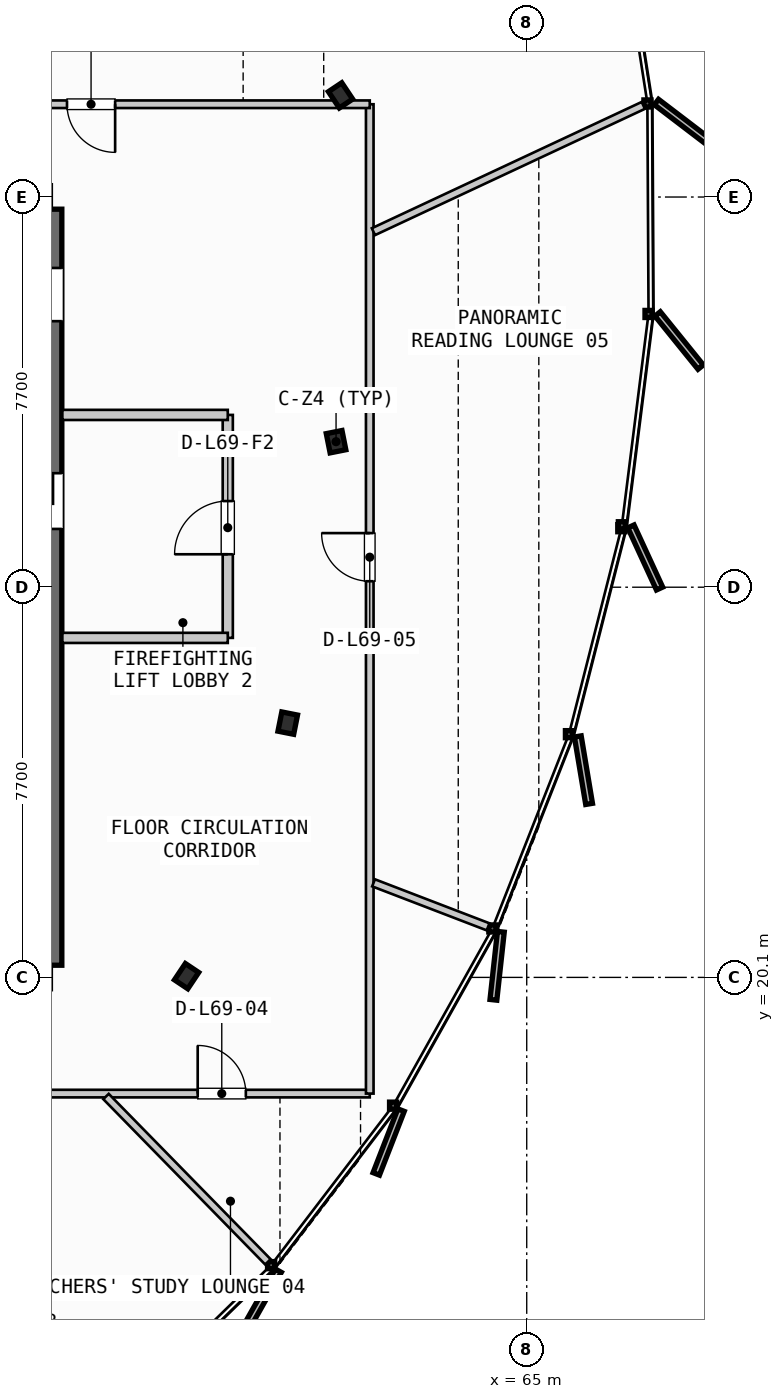
"""IFC4 building model, lengths in metres.
Left out: names, types, materials, properties, quantities, classifications, styles, units other than length and angle.
Written with IfcOpenShell. Run it as: python <this file> out.ifc"""

import sys

from ifc_helpers import new_model, si_unit, direction, frame, frame_2d, origin, origin_2d, place, context, subcontext, project, spatial, rectangle, i_section, extrude, source, transform, mapped, element, fill, save


model = new_model("IFC4")
c1 = context("Model", 3, precision=1e-05, world=origin(), true_north=direction((0.0, 1.0)))
c2 = subcontext(c1, "Body", "Model", "MODEL_VIEW")
j1 = project(units=[si_unit("LENGTHUNIT", "METRE"), si_unit("PLANEANGLEUNIT", "RADIAN")], contexts=[c1])
p1 = place(None, origin())
s1 = spatial("IfcSite", under=j1, at=p1, CompositionType="ELEMENT")
p2 = place(p1, origin())
s2 = spatial("IfcBuilding", under=s1, at=p2, CompositionType="ELEMENT")
p3 = place(p2, frame((0.0, 0.0, 262.9)))
s3 = spatial("IfcBuildingStorey", under=s2, at=p3, CompositionType="ELEMENT", Elevation=262.9)
p4 = place(p3, frame((55.6, 20.34, 0.0), z_axis=(0.0, 0.0, 1.0), x_axis=(0.0, 1.0, 0.0)))
e1 = element("IfcWall", 1, at=p4, inside=s3, PredefinedType="SHEAR", context=c2, shape_type="SweptSolid", body=[
    extrude(rectangle(XDim=14.92, YDim=0.45, at=frame_2d((7.46, 0.0))), origin(), (0.0, 0.0, 1.0), 3.21),
])
p5 = place(p4, frame((12.71, 0.0, 0.0)))
e2 = element("IfcOpeningElement", 2, at=p5, cuts=e1, PredefinedType="OPENING", context=c2, shape_type="SweptSolid", body=[
    extrude(rectangle(XDim=1.05, YDim=2.15, at=frame_2d((0.525, 1.075))), frame((0.0, 0.235, 0.0), z_axis=(0.0, -1.0, 0.0), x_axis=(1.0, 0.0, 0.0)), (0.0, 0.0, 1.0), 0.47),
])
p6 = place(p4, frame((8.61, 0.0, 0.0)))
e3 = element("IfcOpeningElement", 3, at=p6, cuts=e1, PredefinedType="OPENING", context=c2, shape_type="SweptSolid", body=[
    extrude(rectangle(XDim=1.1, YDim=2.2, at=frame_2d((0.55, 1.1))), frame((0.0, 0.235, 0.0), z_axis=(0.0, -1.0, 0.0), x_axis=(1.0, 0.0, 0.0)), (0.0, 0.0, 1.0), 0.47),
])
m1 = source(origin(), c2, "Body", "SweptSolid", [
    extrude(i_section(OverallWidth=0.387, OverallDepth=0.316, WebThickness=0.019, FlangeThickness=0.028, FilletRadius=0.015, at=origin_2d()), origin(), (0.0, 0.0, 1.0), 3.21),
])
for number, where, z_axis, x_axis in (
    (4, (61.237, 30.672, 0.0), (0.0, 0.0, 1.0), (0.981, 0.195, 0.0)),
    (5, (61.326, 37.506, 0.0), (0.0, 0.0, 1.0), (0.831, 0.556, 0.0)),
    (6, (58.287, 20.125, 0.0), (0.0, 0.0, 1.0), (0.831, -0.556, 0.0)),
    (7, (60.284, 25.118, 0.0), (0.0, 0.0, 1.0), (0.981, -0.195, 0.0)),
):
    element("IfcColumn", number, at=place(p3, frame(where, z_axis=z_axis, x_axis=x_axis)), inside=s3, PredefinedType="COLUMN", context=c2, shape_type="MappedRepresentation", body=[
        mapped(m1, transform((0.0, 0.0, 0.0), scale=1.0)),
    ])
p7 = place(p3, frame((59.1, 26.8, 0.0), z_axis=(0.0, 0.0, 1.0), x_axis=(0.0, 1.0, 0.0)))
e8 = element("IfcWall", 8, at=p7, inside=s3, PredefinedType="PARTITIONING", context=c2, shape_type="SweptSolid", body=[
    extrude(rectangle(XDim=4.4, YDim=0.2, at=frame_2d((2.2, 0.0))), origin(), (0.0, 0.0, 1.0), 2.735),
])
p8 = place(p7, frame((1.65, 0.0, 0.0)))
e9 = element("IfcOpeningElement", 9, at=p8, cuts=e8, PredefinedType="OPENING", context=c2, shape_type="SweptSolid", body=[
    extrude(rectangle(XDim=1.05, YDim=2.15, at=frame_2d((0.525, 1.075))), frame((0.0, 0.11, 0.0), z_axis=(0.0, -1.0, 0.0), x_axis=(1.0, 0.0, 0.0)), (0.0, 0.0, 1.0), 0.22),
])
for number, where, z_axis, x_axis in (
    (10, (55.835, 26.8, 0.0), (0.0, 0.0, 1.0), (1.0, 0.0, 0.0)),
    (11, (55.835, 31.2, 0.0), (0.0, 0.0, 1.0), (1.0, 0.0, 0.0)),
):
    element("IfcWall", number, at=place(p3, frame(where, z_axis=z_axis, x_axis=x_axis)), inside=s3, PredefinedType="PARTITIONING", context=c2, shape_type="SweptSolid", body=[
        extrude(rectangle(XDim=3.265, YDim=0.2, at=frame_2d((1.633, 0.0))), origin(), (0.0, 0.0, 1.0), 2.735),
    ])
p9 = place(p3, frame((32.46, 17.807, 0.0), z_axis=(0.0, 0.0, 1.0), x_axis=(1.0, 0.0, 0.0)))
e12 = element("IfcWall", 12, at=p9, inside=s3, PredefinedType="PARTITIONING", context=c2, shape_type="SweptSolid", body=[
    extrude(rectangle(XDim=29.442, YDim=0.15, at=frame_2d((14.721, 0.0))), origin(), (0.0, 0.0, 1.0), 2.735),
])
p10 = place(p9, frame((5.57, 0.0, 0.0)))
e13 = element("IfcOpeningElement", 13, at=p10, cuts=e12, PredefinedType="OPENING", context=c2, shape_type="SweptSolid", body=[
    extrude(rectangle(XDim=0.95, YDim=2.15, at=frame_2d((0.475, 1.075))), frame((0.0, 0.085, 0.0), z_axis=(0.0, -1.0, 0.0), x_axis=(1.0, 0.0, 0.0)), (0.0, 0.0, 1.0), 0.17),
])
p11 = place(p9, frame((11.599, 0.0, 0.0)))
e14 = element("IfcOpeningElement", 14, at=p11, cuts=e12, PredefinedType="OPENING", context=c2, shape_type="SweptSolid", body=[
    extrude(rectangle(XDim=0.95, YDim=2.15, at=frame_2d((0.475, 1.075))), frame((0.0, 0.085, 0.0), z_axis=(0.0, -1.0, 0.0), x_axis=(1.0, 0.0, 0.0)), (0.0, 0.0, 1.0), 0.17),
])
p12 = place(p9, frame((18.949, 0.0, 0.0)))
e15 = element("IfcOpeningElement", 15, at=p12, cuts=e12, PredefinedType="OPENING", context=c2, shape_type="SweptSolid", body=[
    extrude(rectangle(XDim=0.95, YDim=2.15, at=frame_2d((0.475, 1.075))), frame((0.0, 0.085, 0.0), z_axis=(0.0, -1.0, 0.0), x_axis=(1.0, 0.0, 0.0)), (0.0, 0.0, 1.0), 0.17),
])
p13 = place(p9, frame((26.046, 0.0, 0.0)))
e16 = element("IfcOpeningElement", 16, at=p13, cuts=e12, PredefinedType="OPENING", context=c2, shape_type="SweptSolid", body=[
    extrude(rectangle(XDim=0.95, YDim=2.15, at=frame_2d((0.475, 1.075))), frame((0.0, 0.085, 0.0), z_axis=(0.0, -1.0, 0.0), x_axis=(1.0, 0.0, 0.0)), (0.0, 0.0, 1.0), 0.17),
])
p14 = place(p3, frame((61.902, 17.807, 0.0), z_axis=(0.0, 0.0, 1.0), x_axis=(0.0, 1.0, 0.0)))
e17 = element("IfcWall", 17, at=p14, inside=s3, PredefinedType="PARTITIONING", context=c2, shape_type="SweptSolid", body=[
    extrude(rectangle(XDim=19.524, YDim=0.15, at=frame_2d((9.762, 0.0))), origin(), (0.0, 0.0, 1.0), 2.735),
])
p15 = place(p14, frame((10.111, 0.0, 0.0)))
e18 = element("IfcOpeningElement", 18, at=p15, cuts=e17, PredefinedType="OPENING", context=c2, shape_type="SweptSolid", body=[
    extrude(rectangle(XDim=0.95, YDim=2.15, at=frame_2d((0.475, 1.075))), frame((0.0, 0.085, 0.0), z_axis=(0.0, -1.0, 0.0), x_axis=(1.0, 0.0, 0.0)), (0.0, 0.0, 1.0), 0.17),
])
p16 = place(p3, frame((61.902, 37.331, 0.0), z_axis=(0.0, 0.0, 1.0), x_axis=(-1.0, 0.0, 0.0)))
e19 = element("IfcWall", 19, at=p16, inside=s3, PredefinedType="PARTITIONING", context=c2, shape_type="SweptSolid", body=[
    extrude(rectangle(XDim=29.442, YDim=0.15, at=frame_2d((14.721, 0.0))), origin(), (0.0, 0.0, 1.0), 2.735),
])
p17 = place(p16, frame((5.025, 0.0, 0.0)))
e20 = element("IfcOpeningElement", 20, at=p17, cuts=e19, PredefinedType="OPENING", context=c2, shape_type="SweptSolid", body=[
    extrude(rectangle(XDim=0.95, YDim=2.15, at=frame_2d((0.475, 1.075))), frame((0.0, 0.085, 0.0), z_axis=(0.0, -1.0, 0.0), x_axis=(1.0, 0.0, 0.0)), (0.0, 0.0, 1.0), 0.17),
])
p18 = place(p16, frame((12.153, 0.0, 0.0)))
e21 = element("IfcOpeningElement", 21, at=p18, cuts=e19, PredefinedType="OPENING", context=c2, shape_type="SweptSolid", body=[
    extrude(rectangle(XDim=0.95, YDim=2.15, at=frame_2d((0.475, 1.075))), frame((0.0, 0.085, 0.0), z_axis=(0.0, -1.0, 0.0), x_axis=(1.0, 0.0, 0.0)), (0.0, 0.0, 1.0), 0.17),
])
p19 = place(p16, frame((19.237, 0.0, 0.0)))
e22 = element("IfcOpeningElement", 22, at=p19, cuts=e19, PredefinedType="OPENING", context=c2, shape_type="SweptSolid", body=[
    extrude(rectangle(XDim=0.95, YDim=2.15, at=frame_2d((0.475, 1.075))), frame((0.0, 0.085, 0.0), z_axis=(0.0, -1.0, 0.0), x_axis=(1.0, 0.0, 0.0)), (0.0, 0.0, 1.0), 0.17),
])
p20 = place(p16, frame((25.778, 0.0, 0.0)))
e23 = element("IfcOpeningElement", 23, at=p20, cuts=e19, PredefinedType="OPENING", context=c2, shape_type="SweptSolid", body=[
    extrude(rectangle(XDim=0.95, YDim=2.15, at=frame_2d((0.475, 1.075))), frame((0.0, 0.085, 0.0), z_axis=(0.0, -1.0, 0.0), x_axis=(1.0, 0.0, 0.0)), (0.0, 0.0, 1.0), 0.17),
])
p21 = place(p3, frame((56.697, 17.75, 0.0), z_axis=(0.0, 0.0, 1.0), x_axis=(0.699583858336, -0.714550505672, 0.0)))
e24 = element("IfcWall", 24, at=p21, inside=s3, PredefinedType="PARTITIONING", context=c2, shape_type="SweptSolid", body=[
    extrude(rectangle(XDim=4.567, YDim=0.15, at=frame_2d((2.284, 0.0))), origin(), (0.0, 0.0, 1.0), 2.735),
])
p22 = place(p3, frame((61.977, 21.966, 0.0), z_axis=(0.0, 0.0, 1.0), x_axis=(0.93354551038, -0.358458895898, 0.0)))
e25 = element("IfcWall", 25, at=p22, inside=s3, PredefinedType="PARTITIONING", context=c2, shape_type="SweptSolid", body=[
    extrude(rectangle(XDim=2.422, YDim=0.15, at=frame_2d((1.211, 0.0))), origin(), (0.0, 0.0, 1.0), 2.735),
])
p23 = place(p3, frame((61.975, 34.816, 0.0), z_axis=(0.0, 0.0, 1.0), x_axis=(0.905765848745, 0.423778512016, 0.0)))
e26 = element("IfcWall", 26, at=p23, inside=s3, PredefinedType="PARTITIONING", context=c2, shape_type="SweptSolid", body=[
    extrude(rectangle(XDim=5.88, YDim=0.15, at=frame_2d((2.94, 0.0))), origin(), (0.0, 0.0, 1.0), 2.735),
])
p24 = place(p3, frame((51.517, 37.403, 0.0), z_axis=(0.0, 0.0, 1.0), x_axis=(0.442592509331, 0.896722850542, 0.0)))
e27 = element("IfcWall", 27, at=p24, inside=s3, PredefinedType="PARTITIONING", context=c2, shape_type="SweptSolid", body=[
    extrude(rectangle(XDim=15.278, YDim=0.15, at=frame_2d((7.639, 0.0))), origin(), (0.0, 0.0, 1.0), 2.735),
])
m2 = source(origin(), c2, "Body", "SweptSolid", [
    extrude(rectangle(XDim=1.05, YDim=2.15, at=frame_2d((0.525, 1.075))), frame((0.0, 0.025, 0.0), z_axis=(0.0, -1.0, 0.0), x_axis=(1.0, 0.0, 0.0)), (0.0, 0.0, 1.0), 0.05),
])
p25 = place(p8, origin())
e28 = element("IfcDoor", 28, at=p25, inside=s3, OperationType="SINGLE_SWING_LEFT", PredefinedType="DOOR", context=c2, shape_type="MappedRepresentation", body=[
    mapped(m2, transform((0.0, 0.0, 0.0), scale=1.0)),
])
fill(e9, e28)
m3 = source(origin(), c2, "Body", "SweptSolid", [
    extrude(rectangle(XDim=0.95, YDim=2.15, at=frame_2d((0.475, 1.075))), frame((0.0, 0.025, 0.0), z_axis=(0.0, -1.0, 0.0), x_axis=(1.0, 0.0, 0.0)), (0.0, 0.0, 1.0), 0.05),
])
p26 = place(p13, origin())
e29 = element("IfcDoor", 29, at=p26, inside=s3, OperationType="SINGLE_SWING_LEFT", PredefinedType="DOOR", context=c2, shape_type="MappedRepresentation", body=[
    mapped(m3, transform((0.0, 0.0, 0.0), scale=1.0)),
])
fill(e16, e29)
p27 = place(p15, origin())
e30 = element("IfcDoor", 30, at=p27, inside=s3, OperationType="SINGLE_SWING_RIGHT", PredefinedType="DOOR", context=c2, shape_type="MappedRepresentation", body=[
    mapped(m3, transform((0.0, 0.0, 0.0), scale=1.0)),
])
fill(e18, e30)
p28 = place(p17, origin())
e31 = element("IfcDoor", 31, at=p28, inside=s3, OperationType="SINGLE_SWING_LEFT", PredefinedType="DOOR", context=c2, shape_type="MappedRepresentation", body=[
    mapped(m3, transform((0.0, 0.0, 0.0), scale=1.0)),
])
fill(e20, e31)
save(model, sys.argv[1])
